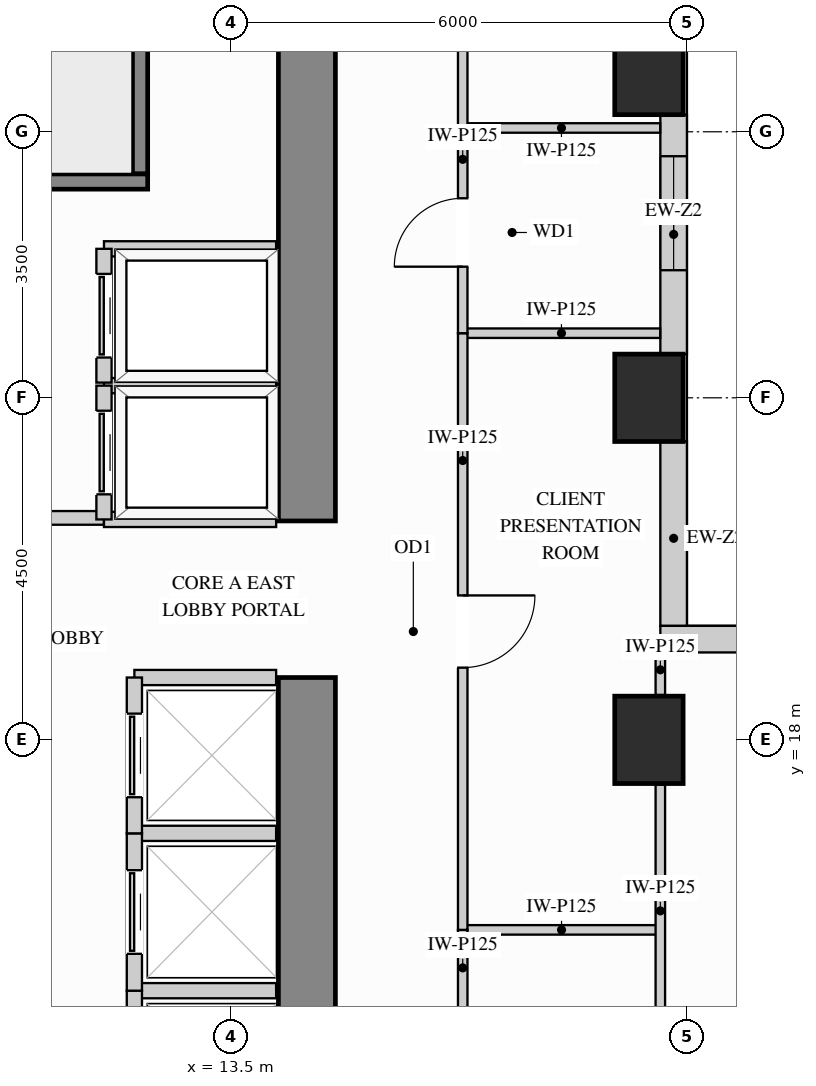
"""IFC4 building model, lengths in metres.
Left out: names, types, materials, properties, quantities, classifications, styles, units other than length and angle.
Written with IfcOpenShell. Run it as: python <this file> out.ifc"""

import sys

from ifc_helpers import new_model, si_unit, direction, frame, frame_2d, origin, origin_2d, place, context, subcontext, project, spatial, rectangle, extrude, source, transform, mapped, element, fill, save


model = new_model("IFC4")
c1 = context("Model", 3, precision=1e-05, world=origin(), true_north=direction((0.0, 1.0)))
c2 = subcontext(c1, "Body", "Model", "MODEL_VIEW")
j1 = project(units=[si_unit("LENGTHUNIT", "METRE"), si_unit("PLANEANGLEUNIT", "RADIAN")], contexts=[c1])
p1 = place(None, origin())
s1 = spatial("IfcSite", under=j1, at=p1, CompositionType="ELEMENT")
p2 = place(p1, origin())
s2 = spatial("IfcBuilding", under=s1, at=p2, CompositionType="ELEMENT")
p3 = place(p2, frame((0.0, 0.0, 135.0)))
s3 = spatial("IfcBuildingStorey", under=s2, at=p3, CompositionType="ELEMENT", Elevation=135.0)
m1 = source(origin(), c2, "Body", "SweptSolid", [
    extrude(rectangle(XDim=0.9, YDim=1.15, at=origin_2d()), origin(), (0.0, 0.0, 1.0), 3.32),
])
for number, where, z_axis, x_axis in (
    (1, (19.0, 18.0, 0.0), (0.0, 0.0, 1.0), (1.0, 0.0, 0.0)),
    (2, (19.0, 22.5, 0.0), (0.0, 0.0, 1.0), (1.0, 0.0, 0.0)),
    (3, (19.0, 26.8, 0.0), (0.0, 0.0, 1.0), (1.0, 0.0, 0.0)),
):
    element("IfcColumn", number, at=place(p3, frame(where, z_axis=z_axis, x_axis=x_axis)), inside=s3, PredefinedType="COLUMN", context=c2, shape_type="MappedRepresentation", body=[
        mapped(m1, transform((0.0, 0.0, 0.0), x_axis=(1.0, 0.0, 0.0), y_axis=(0.0, 1.0, 0.0), z_axis=(0.0, 0.0, 1.0))),
    ])
m2 = source(origin(), c2, "Body", "SweptSolid", [
    extrude(rectangle(XDim=9.945, YDim=0.75, at=frame_2d((4.973, 0.0))), origin(), (0.0, 0.0, 1.0), 3.32),
])
p4 = place(p3, frame((14.5, 8.875, 0.0), z_axis=(0.0, 0.0, 1.0), x_axis=(0.0, 1.0, 0.0)))
e4 = element("IfcWall", 4, at=p4, inside=s3, PredefinedType="SHEAR", context=c2, shape_type="MappedRepresentation", body=[
    mapped(m2, transform((0.0, 0.0, 0.0), x_axis=(1.0, 0.0, 0.0), y_axis=(0.0, 1.0, 0.0), z_axis=(0.0, 0.0, 1.0))),
])
m3 = source(origin(), c2, "Body", "SweptSolid", [
    extrude(rectangle(XDim=8.245, YDim=0.75, at=frame_2d((4.123, 0.0))), origin(), (0.0, 0.0, 1.0), 3.32),
])
p5 = place(p3, frame((14.5, 20.88, 0.0), z_axis=(0.0, 0.0, 1.0), x_axis=(0.0, 1.0, 0.0)))
e5 = element("IfcWall", 5, at=p5, inside=s3, PredefinedType="SHEAR", context=c2, shape_type="MappedRepresentation", body=[
    mapped(m3, transform((0.0, 0.0, 0.0), x_axis=(1.0, 0.0, 0.0), y_axis=(0.0, 1.0, 0.0), z_axis=(0.0, 0.0, 1.0))),
])
m4 = source(origin(), c2, "Body", "SweptSolid", [
    extrude(rectangle(XDim=2.429, YDim=0.35, at=frame_2d((1.214, 0.0))), origin(), (0.0, 0.0, 1.0), 2.459),
])
p6 = place(p3, frame((19.325, 19.498, 0.0), z_axis=(0.0, 0.0, 1.0), x_axis=(0.0, 1.0, 0.0)))
e6 = element("IfcWall", 6, at=p6, inside=s3, PredefinedType="SOLIDWALL", context=c2, shape_type="MappedRepresentation", body=[
    mapped(m4, transform((0.0, 0.0, 0.0), x_axis=(1.0, 0.0, 0.0), y_axis=(0.0, 1.0, 0.0), z_axis=(0.0, 0.0, 1.0))),
])
p7 = place(p3, frame((19.325, 23.073, 0.0), z_axis=(0.0, 0.0, 1.0), x_axis=(0.0, 1.0, 0.0)))
e7 = element("IfcWall", 7, at=p7, inside=s3, PredefinedType="SOLIDWALL", context=c2, shape_type="SweptSolid", body=[
    extrude(rectangle(XDim=3.154, YDim=0.35, at=frame_2d((1.577, 0.0))), origin(), (0.0, 0.0, 1.0), 2.459),
])
p8 = place(p7, frame((1.105, 0.0, 0.78)))
e8 = element("IfcOpeningElement", 8, at=p8, cuts=e7, PredefinedType="OPENING", context=c2, shape_type="SweptSolid", body=[
    extrude(rectangle(XDim=1.5, YDim=1.499, at=frame_2d((0.75, 0.75))), frame((0.0, 0.185, 0.0), z_axis=(0.0, -1.0, 0.0), x_axis=(1.0, 0.0, 0.0)), (0.0, 0.0, 1.0), 0.37),
])
p9 = place(p3, frame((34.75, 19.325, 0.0), z_axis=(0.0, 0.0, 1.0), x_axis=(-1.0, 0.0, 0.0)))
e9 = element("IfcWall", 9, at=p9, inside=s3, PredefinedType="SOLIDWALL", context=c2, shape_type="SweptSolid", body=[
    extrude(rectangle(XDim=15.6, YDim=0.35, at=frame_2d((7.8, 0.0))), origin(), (0.0, 0.0, 1.0), 3.305),
])
p10 = place(p9, frame((4.307, 0.0, 0.78)))
e10 = element("IfcOpeningElement", 10, at=p10, cuts=e9, PredefinedType="OPENING", context=c2, shape_type="SweptSolid", body=[
    extrude(rectangle(XDim=1.5, YDim=2.0, at=frame_2d((0.75, 1.0))), frame((0.0, 0.185, 0.0), z_axis=(0.0, -1.0, 0.0), x_axis=(1.0, 0.0, 0.0)), (0.0, 0.0, 1.0), 0.37),
])
p11 = place(p9, frame((9.793, 0.0, 0.78)))
e11 = element("IfcOpeningElement", 11, at=p11, cuts=e9, PredefinedType="OPENING", context=c2, shape_type="SweptSolid", body=[
    extrude(rectangle(XDim=1.5, YDim=2.0, at=frame_2d((0.75, 1.0))), frame((0.0, 0.185, 0.0), z_axis=(0.0, -1.0, 0.0), x_axis=(1.0, 0.0, 0.0)), (0.0, 0.0, 1.0), 0.37),
])
p12 = place(p3, frame((7.15, 20.92, 0.0), z_axis=(0.0, 0.0, 1.0), x_axis=(1.0, 0.0, 0.0)))
e12 = element("IfcWall", 12, at=p12, inside=s3, PredefinedType="PARTITIONING", context=c2, shape_type="SweptSolid", body=[
    extrude(rectangle(XDim=4.68, YDim=0.18, at=frame_2d((2.34, 0.0))), origin(), (0.0, 0.0, 1.0), 3.305),
])
p13 = place(p12, frame((2.2, 0.0, 0.0)))
e13 = element("IfcOpeningElement", 13, at=p13, cuts=e12, PredefinedType="OPENING", context=c2, shape_type="SweptSolid", body=[
    extrude(rectangle(XDim=1.1, YDim=2.15, at=frame_2d((0.55, 1.075))), frame((0.0, 0.1, 0.0), z_axis=(0.0, -1.0, 0.0), x_axis=(1.0, 0.0, 0.0)), (0.0, 0.0, 1.0), 0.2),
])
m5 = source(origin(), c2, "Body", "SweptSolid", [
    extrude(rectangle(XDim=2.6, YDim=0.125, at=frame_2d((1.3, 0.0))), origin(), (0.0, 0.0, 1.0), 3.305),
])
p14 = place(p3, frame((16.55, 15.5, 0.0), z_axis=(0.0, 0.0, 1.0), x_axis=(1.0, 0.0, 0.0)))
e14 = element("IfcWall", 14, at=p14, inside=s3, PredefinedType="PARTITIONING", context=c2, shape_type="MappedRepresentation", body=[
    mapped(m5, transform((0.0, 0.0, 0.0), x_axis=(1.0, 0.0, 0.0), y_axis=(0.0, 1.0, 0.0), z_axis=(0.0, 0.0, 1.0))),
])
m6 = source(origin(), c2, "Body", "SweptSolid", [
    extrude(rectangle(XDim=2.598, YDim=0.125, at=frame_2d((1.299, 0.0))), origin(), (0.0, 0.0, 1.0), 3.305),
])
for number, where, z_axis, x_axis in (
    (15, (16.55, 23.35, 0.0), (0.0, 0.0, 1.0), (1.0, 0.0, 0.0)),
    (16, (16.55, 26.05, 0.0), (0.0, 0.0, 1.0), (1.0, 0.0, 0.0)),
):
    element("IfcWall", number, at=place(p3, frame(where, z_axis=z_axis, x_axis=x_axis)), inside=s3, PredefinedType="PARTITIONING", context=c2, shape_type="MappedRepresentation", body=[
        mapped(m6, transform((0.0, 0.0, 0.0), x_axis=(1.0, 0.0, 0.0), y_axis=(0.0, 1.0, 0.0), z_axis=(0.0, 0.0, 1.0))),
    ])
m7 = source(origin(), c2, "Body", "SweptSolid", [
    extrude(rectangle(XDim=3.32, YDim=0.125, at=frame_2d((1.66, 0.0))), origin(), (0.0, 0.0, 1.0), 2.617),
])
p15 = place(p3, frame((19.15, 14.09, 0.0), z_axis=(0.0, 0.0, 1.0), x_axis=(0.0, 1.0, 0.0)))
e17 = element("IfcWall", 17, at=p15, inside=s3, PredefinedType="PARTITIONING", context=c2, shape_type="MappedRepresentation", body=[
    mapped(m7, transform((0.0, 0.0, 0.0), x_axis=(1.0, 0.0, 0.0), y_axis=(0.0, 1.0, 0.0), z_axis=(0.0, 0.0, 1.0))),
])
m8 = source(origin(), c2, "Body", "SweptSolid", [
    extrude(rectangle(XDim=0.558, YDim=0.125, at=frame_2d((0.279, 0.0))), origin(), (0.0, 0.0, 1.0), 2.459),
])
p16 = place(p3, frame((19.15, 18.59, 0.0), z_axis=(0.0, 0.0, 1.0), x_axis=(0.0, 1.0, 0.0)))
e18 = element("IfcWall", 18, at=p16, inside=s3, PredefinedType="PARTITIONING", context=c2, shape_type="MappedRepresentation", body=[
    mapped(m8, transform((0.0, 0.0, 0.0), x_axis=(1.0, 0.0, 0.0), y_axis=(0.0, 1.0, 0.0), z_axis=(0.0, 0.0, 1.0))),
])
p17 = place(p3, frame((16.55, 12.35, 0.0), z_axis=(0.0, 0.0, 1.0), x_axis=(0.0, 1.0, 0.0)))
e19 = element("IfcWall", 19, at=p17, inside=s3, PredefinedType="PARTITIONING", context=c2, shape_type="SweptSolid", body=[
    extrude(rectangle(XDim=3.15, YDim=0.125, at=frame_2d((1.575, 0.0))), origin(), (0.0, 0.0, 1.0), 3.305),
])
p18 = place(p17, frame((1.1, 0.0, 0.0)))
e20 = element("IfcOpeningElement", 20, at=p18, cuts=e19, PredefinedType="OPENING", context=c2, shape_type="SweptSolid", body=[
    extrude(rectangle(XDim=0.95, YDim=2.15, at=frame_2d((0.475, 1.075))), frame((0.0, 0.073, 0.0), z_axis=(0.0, -1.0, 0.0), x_axis=(1.0, 0.0, 0.0)), (0.0, 0.0, 1.0), 0.145),
])
p19 = place(p3, frame((16.55, 15.5, 0.0), z_axis=(0.0, 0.0, 1.0), x_axis=(0.0, 1.0, 0.0)))
e21 = element("IfcWall", 21, at=p19, inside=s3, PredefinedType="PARTITIONING", context=c2, shape_type="SweptSolid", body=[
    extrude(rectangle(XDim=7.85, YDim=0.125, at=frame_2d((3.925, 0.0))), origin(), (0.0, 0.0, 1.0), 3.305),
])
p20 = place(p19, frame((3.45, 0.0, 0.0)))
e22 = element("IfcOpeningElement", 22, at=p20, cuts=e21, PredefinedType="OPENING", context=c2, shape_type="SweptSolid", body=[
    extrude(rectangle(XDim=0.95, YDim=2.15, at=frame_2d((0.475, 1.075))), frame((0.0, 0.073, 0.0), z_axis=(0.0, -1.0, 0.0), x_axis=(1.0, 0.0, 0.0)), (0.0, 0.0, 1.0), 0.145),
])
p21 = place(p3, frame((16.55, 26.05, 0.0), z_axis=(0.0, 0.0, 1.0), x_axis=(0.0, 1.0, 0.0)))
e23 = element("IfcWall", 23, at=p21, inside=s3, PredefinedType="PARTITIONING", context=c2, shape_type="SweptSolid", body=[
    extrude(rectangle(XDim=7.1, YDim=0.125, at=frame_2d((3.55, 0.0))), origin(), (0.0, 0.0, 1.0), 3.305),
])
p22 = place(p21, frame((3.075, 0.0, 0.0)))
e24 = element("IfcOpeningElement", 24, at=p22, cuts=e23, PredefinedType="OPENING", context=c2, shape_type="SweptSolid", body=[
    extrude(rectangle(XDim=0.95, YDim=2.15, at=frame_2d((0.475, 1.075))), frame((0.0, 0.073, 0.0), z_axis=(0.0, -1.0, 0.0), x_axis=(1.0, 0.0, 0.0)), (0.0, 0.0, 1.0), 0.145),
])
p23 = place(p3, frame((16.55, 23.35, 0.0), z_axis=(0.0, 0.0, 1.0), x_axis=(0.0, 1.0, 0.0)))
e25 = element("IfcWall", 25, at=p23, inside=s3, PredefinedType="PARTITIONING", context=c2, shape_type="SweptSolid", body=[
    extrude(rectangle(XDim=2.7, YDim=0.125, at=frame_2d((1.35, 0.0))), origin(), (0.0, 0.0, 1.0), 3.305),
])
p24 = place(p23, frame((0.875, 0.0, 0.0)))
e26 = element("IfcOpeningElement", 26, at=p24, cuts=e25, PredefinedType="OPENING", context=c2, shape_type="SweptSolid", body=[
    extrude(rectangle(XDim=0.9, YDim=2.15, at=frame_2d((0.45, 1.075))), frame((0.0, 0.073, 0.0), z_axis=(0.0, -1.0, 0.0), x_axis=(1.0, 0.0, 0.0)), (0.0, 0.0, 1.0), 0.145),
])
m9 = source(origin(), c2, "Body", "SweptSolid", [
    extrude(rectangle(XDim=2.265, YDim=0.2, at=frame_2d((1.132, 0.0))), origin(), (0.0, 0.0, 1.0), 3.305),
])
for number, where, z_axis, x_axis in (
    (27, (11.83, 22.66, 0.0), (0.0, 0.0, 1.0), (1.0, 0.0, 0.0)),
    (28, (11.83, 20.9, 0.0), (0.0, 0.0, 1.0), (1.0, 0.0, 0.0)),
):
    element("IfcWall", number, at=place(p3, frame(where, z_axis=z_axis, x_axis=x_axis)), inside=s3, PredefinedType="PARTITIONING", context=c2, shape_type="MappedRepresentation", body=[
        mapped(m9, transform((0.0, 0.0, 0.0), x_axis=(1.0, 0.0, 0.0), y_axis=(0.0, 1.0, 0.0), z_axis=(0.0, 0.0, 1.0))),
    ])
p25 = place(p3, frame((11.83, 20.9, 0.0), z_axis=(0.0, 0.0, 1.0), x_axis=(0.0, 1.0, 0.0)))
e29 = element("IfcWall", 29, at=p25, inside=s3, PredefinedType="PARTITIONING", context=c2, shape_type="SweptSolid", body=[
    extrude(rectangle(XDim=1.76, YDim=0.2, at=frame_2d((0.88, 0.0))), origin(), (0.0, 0.0, 1.0), 3.305),
])
p26 = place(p25, frame((0.33, 0.0, 0.0)))
e30 = element("IfcOpeningElement", 30, at=p26, cuts=e29, PredefinedType="OPENING", context=c2, shape_type="SweptSolid", body=[
    extrude(rectangle(XDim=1.1, YDim=2.2, at=frame_2d((0.55, 1.1))), frame((0.0, 0.11, 0.0), z_axis=(0.0, -1.0, 0.0), x_axis=(1.0, 0.0, 0.0)), (0.0, 0.0, 1.0), 0.22),
])
p27 = place(p3, frame((11.83, 24.46, 0.0), z_axis=(0.0, 0.0, 1.0), x_axis=(1.0, 0.0, 0.0)))
e31 = element("IfcWall", 31, at=p27, inside=s3, PredefinedType="PARTITIONING", context=c2, shape_type="MappedRepresentation", body=[
    mapped(m9, transform((0.0, 0.0, 0.0), x_axis=(1.0, 0.0, 0.0), y_axis=(0.0, 1.0, 0.0), z_axis=(0.0, 0.0, 1.0))),
])
p28 = place(p3, frame((11.83, 22.7, 0.0), z_axis=(0.0, 0.0, 1.0), x_axis=(0.0, 1.0, 0.0)))
e32 = element("IfcWall", 32, at=p28, inside=s3, PredefinedType="PARTITIONING", context=c2, shape_type="SweptSolid", body=[
    extrude(rectangle(XDim=1.76, YDim=0.2, at=frame_2d((0.88, 0.0))), origin(), (0.0, 0.0, 1.0), 3.305),
])
p29 = place(p28, frame((0.33, 0.0, 0.0)))
e33 = element("IfcOpeningElement", 33, at=p29, cuts=e32, PredefinedType="OPENING", context=c2, shape_type="SweptSolid", body=[
    extrude(rectangle(XDim=1.1, YDim=2.2, at=frame_2d((0.55, 1.1))), frame((0.0, 0.11, 0.0), z_axis=(0.0, -1.0, 0.0), x_axis=(1.0, 0.0, 0.0)), (0.0, 0.0, 1.0), 0.22),
])
m10 = source(origin(), c2, "Body", "SweptSolid", [
    extrude(rectangle(XDim=1.865, YDim=0.2, at=frame_2d((0.933, 0.0))), origin(), (0.0, 0.0, 1.0), 3.305),
])
p30 = place(p3, frame((12.23, 14.7, 0.0), z_axis=(0.0, 0.0, 1.0), x_axis=(1.0, 0.0, 0.0)))
e34 = element("IfcWall", 34, at=p30, inside=s3, PredefinedType="PARTITIONING", context=c2, shape_type="MappedRepresentation", body=[
    mapped(m10, transform((0.0, 0.0, 0.0), x_axis=(1.0, 0.0, 0.0), y_axis=(0.0, 1.0, 0.0), z_axis=(0.0, 0.0, 1.0))),
])
p31 = place(p3, frame((12.23, 12.63, 0.0), z_axis=(0.0, 0.0, 1.0), x_axis=(0.0, 1.0, 0.0)))
e35 = element("IfcWall", 35, at=p31, inside=s3, PredefinedType="PARTITIONING", context=c2, shape_type="SweptSolid", body=[
    extrude(rectangle(XDim=2.07, YDim=0.2, at=frame_2d((1.035, 0.0))), origin(), (0.0, 0.0, 1.0), 3.305),
])
p32 = place(p31, frame((0.485, 0.0, 0.0)))
e36 = element("IfcOpeningElement", 36, at=p32, cuts=e35, PredefinedType="OPENING", context=c2, shape_type="SweptSolid", body=[
    extrude(rectangle(XDim=1.1, YDim=2.2, at=frame_2d((0.55, 1.1))), frame((0.0, 0.11, 0.0), z_axis=(0.0, -1.0, 0.0), x_axis=(1.0, 0.0, 0.0)), (0.0, 0.0, 1.0), 0.22),
])
p33 = place(p3, frame((12.23, 16.77, 0.0), z_axis=(0.0, 0.0, 1.0), x_axis=(1.0, 0.0, 0.0)))
e37 = element("IfcWall", 37, at=p33, inside=s3, PredefinedType="PARTITIONING", context=c2, shape_type="MappedRepresentation", body=[
    mapped(m10, transform((0.0, 0.0, 0.0), x_axis=(1.0, 0.0, 0.0), y_axis=(0.0, 1.0, 0.0), z_axis=(0.0, 0.0, 1.0))),
])
p34 = place(p3, frame((12.23, 14.7, 0.0), z_axis=(0.0, 0.0, 1.0), x_axis=(0.0, 1.0, 0.0)))
e38 = element("IfcWall", 38, at=p34, inside=s3, PredefinedType="PARTITIONING", context=c2, shape_type="SweptSolid", body=[
    extrude(rectangle(XDim=2.07, YDim=0.2, at=frame_2d((1.035, 0.0))), origin(), (0.0, 0.0, 1.0), 3.305),
])
p35 = place(p34, frame((0.485, 0.0, 0.0)))
e39 = element("IfcOpeningElement", 39, at=p35, cuts=e38, PredefinedType="OPENING", context=c2, shape_type="SweptSolid", body=[
    extrude(rectangle(XDim=1.1, YDim=2.2, at=frame_2d((0.55, 1.1))), frame((0.0, 0.11, 0.0), z_axis=(0.0, -1.0, 0.0), x_axis=(1.0, 0.0, 0.0)), (0.0, 0.0, 1.0), 0.22),
])
p36 = place(p3, frame((12.23, 18.82, 0.0), z_axis=(0.0, 0.0, 1.0), x_axis=(1.0, 0.0, 0.0)))
e40 = element("IfcWall", 40, at=p36, inside=s3, PredefinedType="PARTITIONING", context=c2, shape_type="MappedRepresentation", body=[
    mapped(m10, transform((0.0, 0.0, 0.0), x_axis=(1.0, 0.0, 0.0), y_axis=(0.0, 1.0, 0.0), z_axis=(0.0, 0.0, 1.0))),
])
p37 = place(p3, frame((12.23, 16.77, 0.0), z_axis=(0.0, 0.0, 1.0), x_axis=(0.0, 1.0, 0.0)))
e41 = element("IfcWall", 41, at=p37, inside=s3, PredefinedType="PARTITIONING", context=c2, shape_type="SweptSolid", body=[
    extrude(rectangle(XDim=2.05, YDim=0.2, at=frame_2d((1.025, 0.0))), origin(), (0.0, 0.0, 1.0), 3.305),
])
p38 = place(p37, frame((0.475, 0.0, 0.0)))
e42 = element("IfcOpeningElement", 42, at=p38, cuts=e41, PredefinedType="OPENING", context=c2, shape_type="SweptSolid", body=[
    extrude(rectangle(XDim=1.1, YDim=2.2, at=frame_2d((0.55, 1.1))), frame((0.0, 0.11, 0.0), z_axis=(0.0, -1.0, 0.0), x_axis=(1.0, 0.0, 0.0)), (0.0, 0.0, 1.0), 0.22),
])
m11 = source(origin(), c2, "Body", "SweptSolid", [
    extrude(rectangle(XDim=3.678, YDim=0.2, at=frame_2d((1.839, 0.0))), origin(), (0.0, 0.0, 1.0), 3.32),
])
p39 = place(p3, frame((12.305, 25.445, 0.0), z_axis=(0.0, 0.0, 1.0), x_axis=(0.0, 1.0, 0.0)))
e43 = element("IfcWall", 43, at=p39, inside=s3, PredefinedType="SHEAR", context=c2, shape_type="MappedRepresentation", body=[
    mapped(m11, transform((0.0, 0.0, 0.0), x_axis=(1.0, 0.0, 0.0), y_axis=(0.0, 1.0, 0.0), z_axis=(0.0, 0.0, 1.0))),
])
p40 = place(p3, frame((4.877, 25.345, 0.0), z_axis=(0.0, 0.0, 1.0), x_axis=(1.0, 0.0, 0.0)))
e44 = element("IfcWall", 44, at=p40, inside=s3, PredefinedType="SHEAR", context=c2, shape_type="SweptSolid", body=[
    extrude(rectangle(XDim=7.528, YDim=0.2, at=frame_2d((3.764, 0.0))), origin(), (0.0, 0.0, 1.0), 3.32),
])
p41 = place(p40, frame((0.4, 0.0, 0.0)))
e45 = element("IfcOpeningElement", 45, at=p41, cuts=e44, PredefinedType="OPENING", context=c2, shape_type="SweptSolid", body=[
    extrude(rectangle(XDim=1.1, YDim=2.15, at=frame_2d((0.55, 1.075))), frame((0.0, 0.11, 0.0), z_axis=(0.0, -1.0, 0.0), x_axis=(1.0, 0.0, 0.0)), (0.0, 0.0, 1.0), 0.22),
])
m12 = source(origin(), c2, "Body", "SweptSolid", [
    extrude(rectangle(XDim=1.1, YDim=2.2, at=frame_2d((0.55, 1.1))), frame((0.0, 0.025, 0.0), z_axis=(0.0, -1.0, 0.0), x_axis=(1.0, 0.0, 0.0)), (0.0, 0.0, 1.0), 0.05),
])
p42 = place(p26, origin())
e46 = element("IfcDoor", 46, at=p42, inside=s3, OperationType="SLIDING_TO_LEFT", PredefinedType="DOOR", context=c2, shape_type="MappedRepresentation", body=[
    mapped(m12, transform((0.0, 0.0, 0.0), x_axis=(1.0, 0.0, 0.0), y_axis=(0.0, 1.0, 0.0), z_axis=(0.0, 0.0, 1.0))),
])
fill(e30, e46)
p43 = place(p29, origin())
e47 = element("IfcDoor", 47, at=p43, inside=s3, OperationType="SLIDING_TO_LEFT", PredefinedType="DOOR", context=c2, shape_type="MappedRepresentation", body=[
    mapped(m12, transform((0.0, 0.0, 0.0), x_axis=(1.0, 0.0, 0.0), y_axis=(0.0, 1.0, 0.0), z_axis=(0.0, 0.0, 1.0))),
])
fill(e33, e47)
p44 = place(p35, origin())
e48 = element("IfcDoor", 48, at=p44, inside=s3, OperationType="SLIDING_TO_LEFT", PredefinedType="DOOR", context=c2, shape_type="MappedRepresentation", body=[
    mapped(m12, transform((0.0, 0.0, 0.0), x_axis=(1.0, 0.0, 0.0), y_axis=(0.0, 1.0, 0.0), z_axis=(0.0, 0.0, 1.0))),
])
fill(e39, e48)
p45 = place(p38, origin())
e49 = element("IfcDoor", 49, at=p45, inside=s3, OperationType="SLIDING_TO_LEFT", PredefinedType="DOOR", context=c2, shape_type="MappedRepresentation", body=[
    mapped(m12, transform((0.0, 0.0, 0.0), x_axis=(1.0, 0.0, 0.0), y_axis=(0.0, 1.0, 0.0), z_axis=(0.0, 0.0, 1.0))),
])
fill(e42, e49)
m13 = source(origin(), c2, "Body", "SweptSolid", [
    extrude(rectangle(XDim=0.95, YDim=2.15, at=frame_2d((0.475, 1.075))), frame((0.0, 0.025, 0.0), z_axis=(0.0, -1.0, 0.0), x_axis=(1.0, 0.0, 0.0)), (0.0, 0.0, 1.0), 0.05),
])
p46 = place(p20, origin())
e50 = element("IfcDoor", 50, at=p46, inside=s3, OperationType="SINGLE_SWING_RIGHT", PredefinedType="DOOR", context=c2, shape_type="MappedRepresentation", body=[
    mapped(m13, transform((0.0, 0.0, 0.0), x_axis=(1.0, 0.0, 0.0), y_axis=(0.0, 1.0, 0.0), z_axis=(0.0, 0.0, 1.0))),
])
fill(e22, e50)
m14 = source(origin(), c2, "Body", "SweptSolid", [
    extrude(rectangle(XDim=0.9, YDim=2.15, at=frame_2d((0.45, 1.075))), frame((0.0, 0.025, 0.0), z_axis=(0.0, -1.0, 0.0), x_axis=(1.0, 0.0, 0.0)), (0.0, 0.0, 1.0), 0.05),
])
p47 = place(p24, origin())
e51 = element("IfcDoor", 51, at=p47, inside=s3, OperationType="SINGLE_SWING_LEFT", PredefinedType="DOOR", context=c2, shape_type="MappedRepresentation", body=[
    mapped(m14, transform((0.0, 0.0, 0.0), x_axis=(1.0, 0.0, 0.0), y_axis=(0.0, 1.0, 0.0), z_axis=(0.0, 0.0, 1.0))),
])
fill(e26, e51)
m15 = source(origin(), c2, "Body", "SweptSolid", [
    extrude(rectangle(XDim=1.5, YDim=1.499, at=frame_2d((0.75, 0.75))), frame((0.0, 0.03, 0.0), z_axis=(0.0, -1.0, 0.0), x_axis=(1.0, 0.0, 0.0)), (0.0, 0.0, 1.0), 0.06),
])
p48 = place(p8, origin())
e52 = element("IfcWindow", 52, at=p48, inside=s3, PartitioningType="SINGLE_PANEL", PredefinedType="WINDOW", context=c2, shape_type="MappedRepresentation", body=[
    mapped(m15, transform((0.0, 0.0, 0.0), x_axis=(1.0, 0.0, 0.0), y_axis=(0.0, 1.0, 0.0), z_axis=(0.0, 0.0, 1.0))),
])
fill(e8, e52)
save(model, sys.argv[1])
